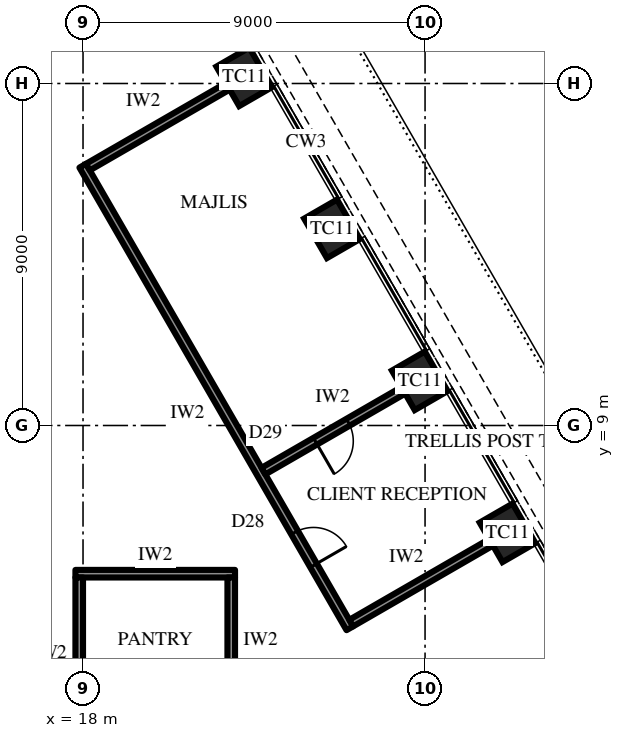
"""IFC4 building model, lengths in metres.
Left out: names, types, materials, properties, quantities, classifications, styles, units other than length and angle.
Written with IfcOpenShell. Run it as: python <this file> out.ifc"""

import sys

from ifc_helpers import new_model, si_unit, direction, frame, frame_2d, origin, origin_2d, place, context, subcontext, project, spatial, rectangle, extrude, element, fill, save


model = new_model("IFC4")
c1 = context("Model", 3, precision=1e-05, world=origin(), true_north=direction((0.0, 1.0)))
c2 = subcontext(c1, "Body", "Model", "MODEL_VIEW")
j1 = project(units=[si_unit("LENGTHUNIT", "METRE"), si_unit("PLANEANGLEUNIT", "RADIAN")], contexts=[c1])
p1 = place(None, origin())
s1 = spatial("IfcSite", under=j1, at=p1, CompositionType="ELEMENT")
p2 = place(p1, origin())
s2 = spatial("IfcBuilding", under=s1, at=p2, CompositionType="ELEMENT")
p3 = place(p2, frame((0.0, 0.0, 261.7)))
s3 = spatial("IfcBuildingStorey", under=s2, at=p3, CompositionType="ELEMENT", Elevation=261.7)
for number, where, z_axis, x_axis in (
    (1, (29.171, 6.175, 0.0), (0.0, 0.0, 1.0), (-0.5, 0.866, 0.0)),
    (2, (26.861, 10.175, 0.0), (0.0, 0.0, 1.0), (-0.5, 0.866, 0.0)),
    (3, (24.552, 14.175, 0.0), (0.0, 0.0, 1.0), (-0.5, 0.866, 0.0)),
    (4, (22.242, 18.175, 0.0), (0.0, 0.0, 1.0), (-0.5, 0.866, 0.0)),
):
    element("IfcColumn", number, at=place(p3, frame(where, z_axis=z_axis, x_axis=x_axis)), inside=s3, PredefinedType="COLUMN", context=c2, shape_type="SweptSolid", body=[
        extrude(rectangle(XDim=1.2, YDim=1.0, at=origin_2d()), origin(), (0.0, 0.0, 1.0), 4.2),
    ])
p4 = place(p3, frame((25.021, 3.663, 0.0), z_axis=(0.0, 0.0, 1.0), x_axis=(-0.500002095642, 0.866024193862, 0.0)))
e5 = element("IfcWall", 5, at=p4, inside=s3, PredefinedType="PARTITIONING", context=c2, shape_type="SweptSolid", body=[
    extrude(rectangle(XDim=14.057, YDim=0.2, at=frame_2d((7.028, 0.0))), origin(), (0.0, 0.0, 1.0), 4.0),
])
p5 = place(p4, frame((1.909, 0.0, 0.0)))
e6 = element("IfcOpeningElement", 6, at=p5, cuts=e5, PredefinedType="OPENING", context=c2, shape_type="SweptSolid", body=[
    extrude(rectangle(XDim=1.0, YDim=2.2, at=frame_2d((0.5, 1.1))), frame((0.0, 0.11, 0.0), z_axis=(0.0, -1.0, 0.0), x_axis=(1.0, 0.0, 0.0)), (0.0, 0.0, 1.0), 0.22),
])
p6 = place(p3, frame((25.057, 3.8, 0.0), z_axis=(0.0, 0.0, 1.0), x_axis=(0.866028703517, 0.499994284652, 0.0)))
e7 = element("IfcWall", 7, at=p6, inside=s3, PredefinedType="PARTITIONING", context=c2, shape_type="SweptSolid", body=[
    extrude(rectangle(XDim=4.25, YDim=0.2, at=frame_2d((2.125, 0.0))), origin(), (0.0, 0.0, 1.0), 3.082),
])
p7 = place(p3, frame((22.748, 7.8, 0.0), z_axis=(0.0, 0.0, 1.0), x_axis=(0.866028703517, 0.499994284652, 0.0)))
e8 = element("IfcWall", 8, at=p7, inside=s3, PredefinedType="PARTITIONING", context=c2, shape_type="SweptSolid", body=[
    extrude(rectangle(XDim=4.25, YDim=0.2, at=frame_2d((2.125, 0.0))), origin(), (0.0, 0.0, 1.0), 3.082),
])
p8 = place(p7, frame((1.575, 0.0, 0.0)))
e9 = element("IfcOpeningElement", 9, at=p8, cuts=e8, PredefinedType="OPENING", context=c2, shape_type="SweptSolid", body=[
    extrude(rectangle(XDim=1.0, YDim=2.2, at=frame_2d((0.5, 1.1))), frame((0.0, 0.11, 0.0), z_axis=(0.0, -1.0, 0.0), x_axis=(1.0, 0.0, 0.0)), (0.0, 0.0, 1.0), 0.22),
])
p9 = place(p3, frame((18.129, 15.8, 0.0), z_axis=(0.0, 0.0, 1.0), x_axis=(0.866014341725, 0.50001915956, 0.0)))
e10 = element("IfcWall", 10, at=p9, inside=s3, PredefinedType="PARTITIONING", context=c2, shape_type="SweptSolid", body=[
    extrude(rectangle(XDim=4.25, YDim=0.2, at=frame_2d((2.125, 0.0))), origin(), (0.0, 0.0, 1.0), 3.082),
])
p10 = place(p3, frame((17.8, 5.1, 0.0), z_axis=(0.0, 0.0, 1.0), x_axis=(1.0, 0.0, 0.0)))
e11 = element("IfcWall", 11, at=p10, inside=s3, PredefinedType="PARTITIONING", context=c2, shape_type="SweptSolid", body=[
    extrude(rectangle(XDim=4.2, YDim=0.2, at=frame_2d((2.1, 0.0))), origin(), (0.0, 0.0, 1.0), 4.0),
])
for number, where, z_axis, x_axis in (
    (12, (17.9, 1.7, 0.0), (0.0, 0.0, 1.0), (0.0, 1.0, 0.0)),
    (13, (21.9, 1.7, 0.0), (0.0, 0.0, 1.0), (0.0, 1.0, 0.0)),
):
    element("IfcWall", number, at=place(p3, frame(where, z_axis=z_axis, x_axis=x_axis)), inside=s3, PredefinedType="PARTITIONING", context=c2, shape_type="SweptSolid", body=[
        extrude(rectangle(XDim=3.3, YDim=0.2, at=frame_2d((1.65, 0.0))), origin(), (0.0, 0.0, 1.0), 4.0),
    ])
p11 = place(p5, frame((1.0, 0.0, 0.0), z_axis=(0.0, 0.0, 1.0), x_axis=(-1.0, 0.0, 0.0)))
e14 = element("IfcDoor", 14, at=p11, inside=s3, OperationType="SINGLE_SWING_LEFT", PredefinedType="DOOR", context=c2, shape_type="SweptSolid", body=[
    extrude(rectangle(XDim=1.0, YDim=2.2, at=frame_2d((0.5, 1.1))), frame((0.0, 0.025, 0.0), z_axis=(0.0, -1.0, 0.0), x_axis=(1.0, 0.0, 0.0)), (0.0, 0.0, 1.0), 0.05),
])
fill(e6, e14)
p12 = place(p8, frame((1.0, 0.0, 0.0), z_axis=(0.0, 0.0, 1.0), x_axis=(-1.0, 0.0, 0.0)))
e15 = element("IfcDoor", 15, at=p12, inside=s3, OperationType="SINGLE_SWING_LEFT", PredefinedType="DOOR", context=c2, shape_type="SweptSolid", body=[
    extrude(rectangle(XDim=1.0, YDim=2.2, at=frame_2d((0.5, 1.1))), frame((0.0, 0.025, 0.0), z_axis=(0.0, -1.0, 0.0), x_axis=(1.0, 0.0, 0.0)), (0.0, 0.0, 1.0), 0.05),
])
fill(e9, e15)
save(model, sys.argv[1])
